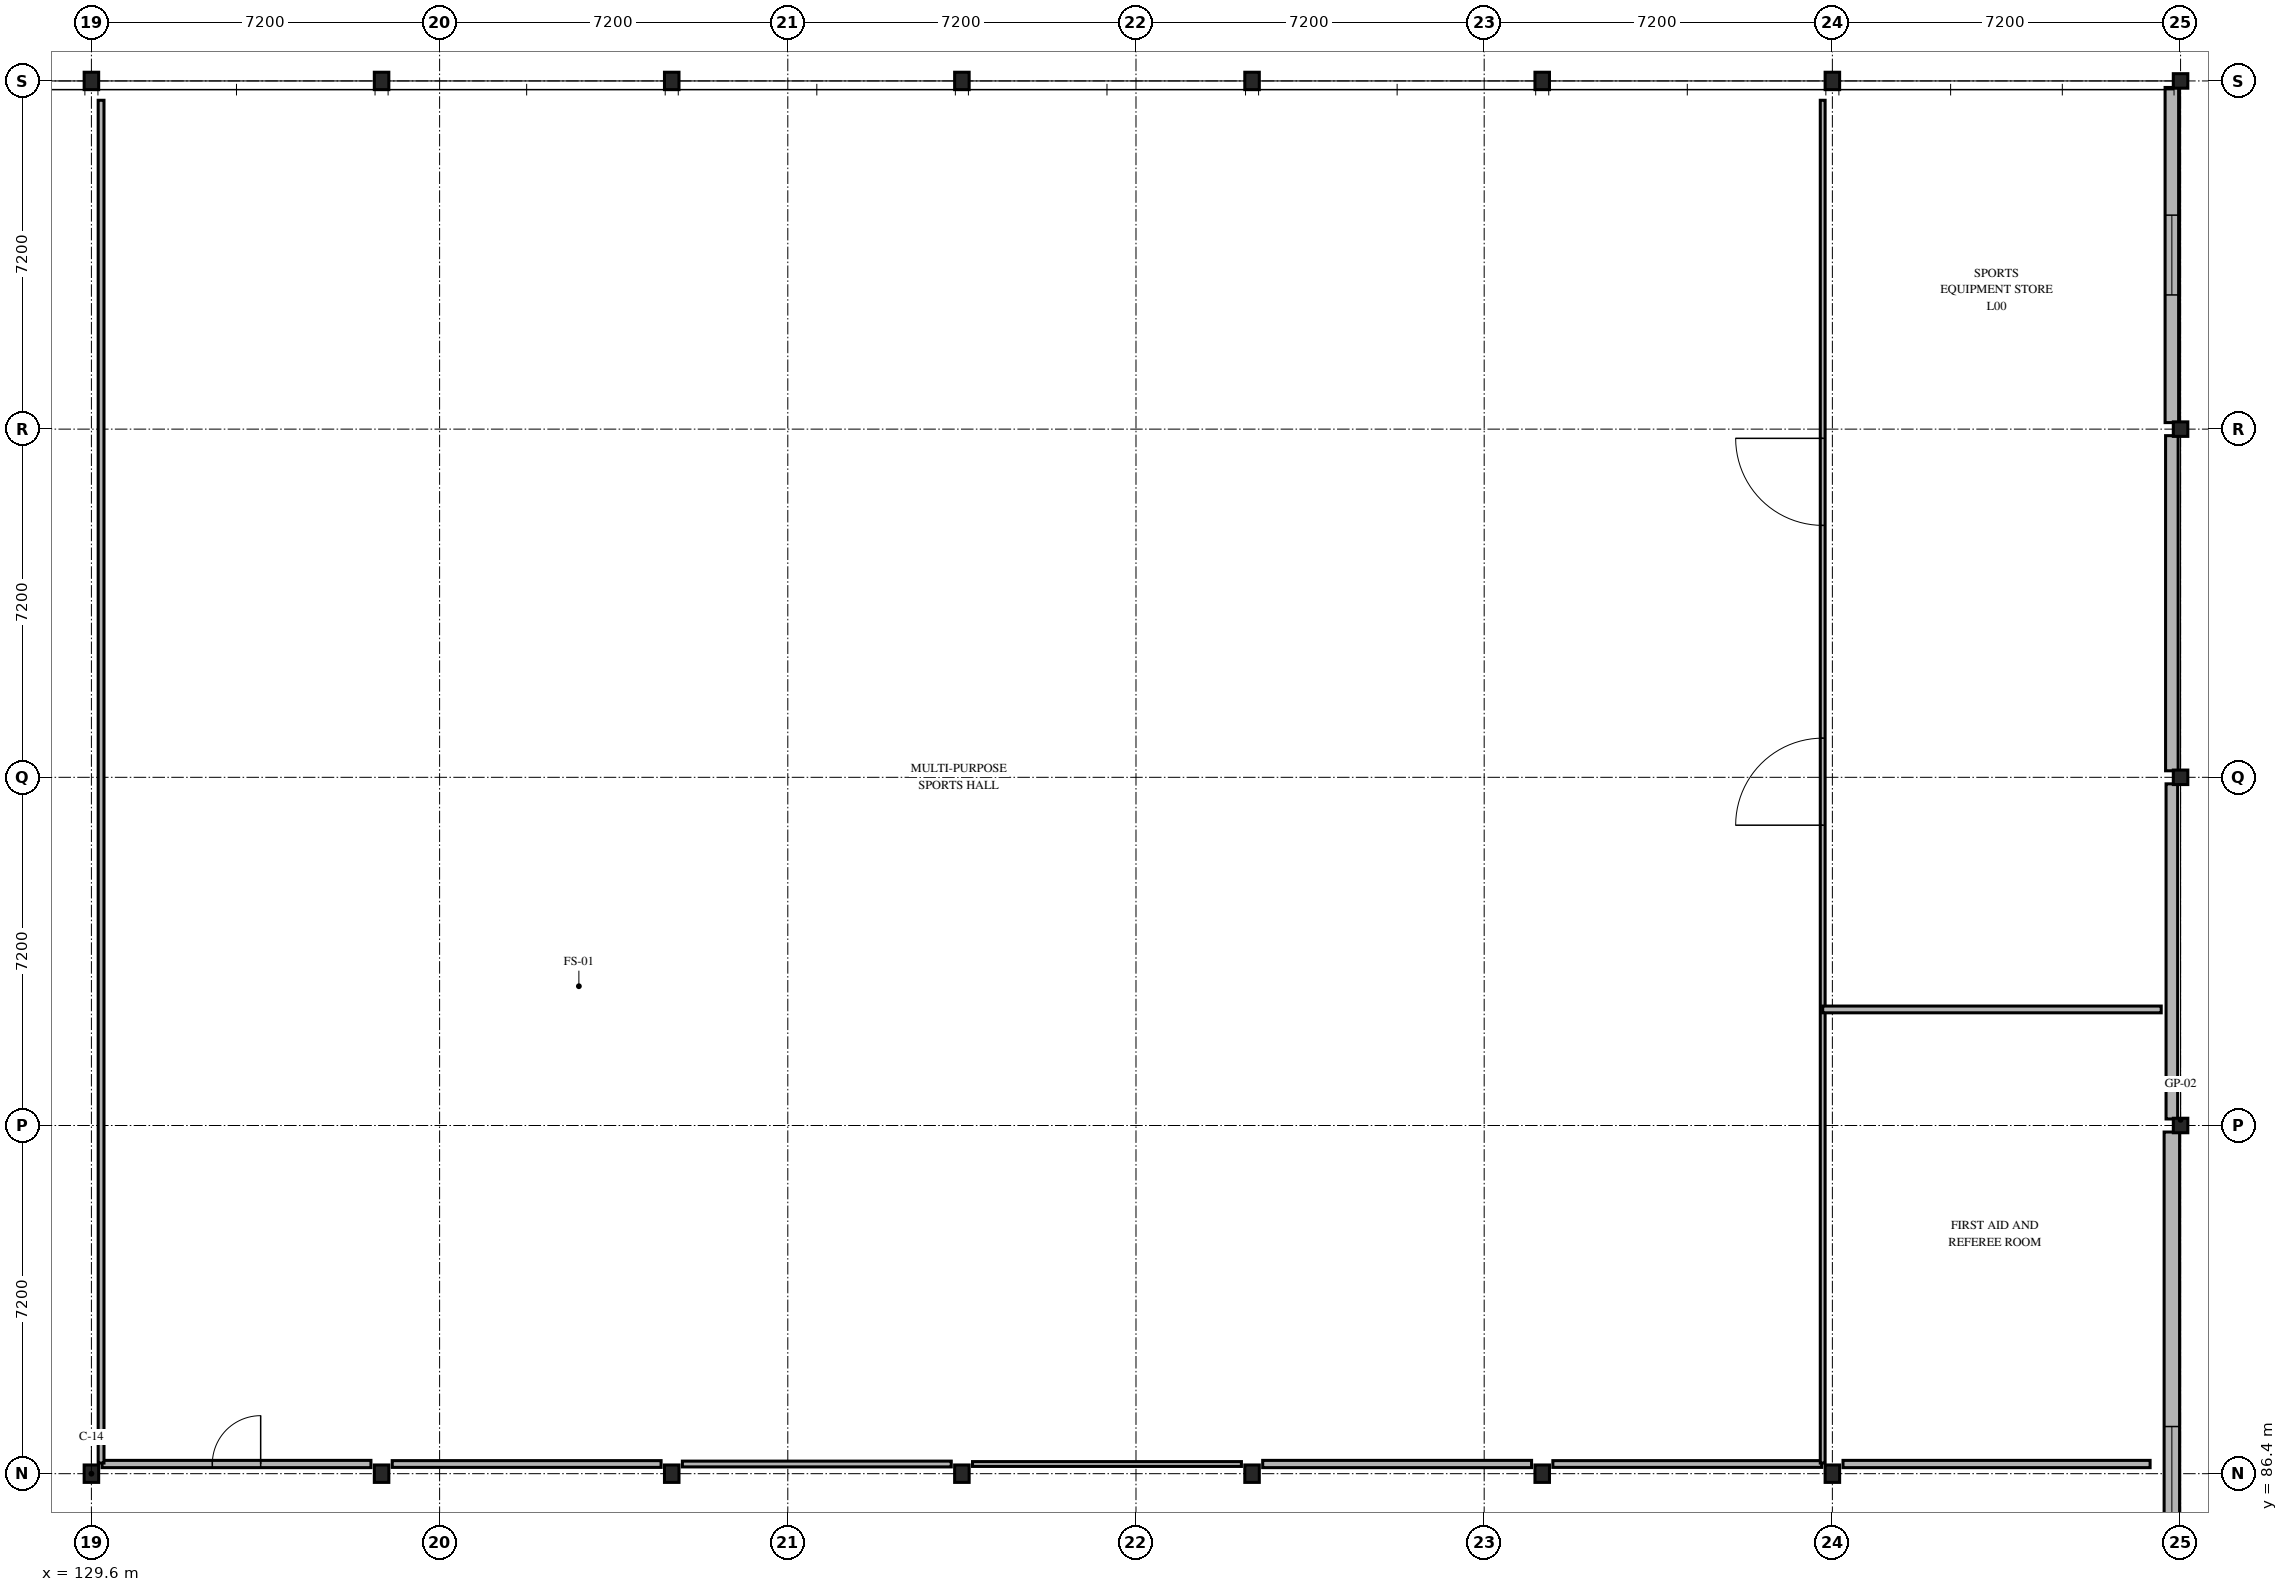
"""IFC4 building model, lengths in metres.
Left out: names, types, materials, properties, quantities, classifications, styles, units other than length and angle.
Written with IfcOpenShell. Run it as: python <this file> out.ifc"""

import sys

from ifc_helpers import new_model, si_unit, direction, frame, frame_2d, origin, origin_2d, place, context, subcontext, project, spatial, rectangle, i_section, extrude, element, fill, save


model = new_model("IFC4")
c1 = context("Model", 3, precision=1e-05, world=origin(), true_north=direction((0.0, 1.0)))
c2 = subcontext(c1, "Body", "Model", "MODEL_VIEW")
j1 = project(units=[si_unit("LENGTHUNIT", "METRE"), si_unit("PLANEANGLEUNIT", "RADIAN")], contexts=[c1])
p1 = place(None, origin())
s1 = spatial("IfcSite", under=j1, at=p1, CompositionType="ELEMENT")
p2 = place(p1, origin())
s2 = spatial("IfcBuilding", under=s1, at=p2, CompositionType="ELEMENT")
p3 = place(p2, origin())
s3 = spatial("IfcBuildingStorey", under=s2, at=p3, CompositionType="ELEMENT", Elevation=0.0)
for number, where, z_axis, x_axis in (
    (1, (129.6, 86.4, 0.0), (0.0, 0.0, 1.0), (1.0, 0.0, 0.0)),
    (2, (129.6, 115.2, 0.0), (0.0, 0.0, 1.0), (1.0, 0.0, 0.0)),
    (3, (135.6, 86.4, 0.0), (0.0, 0.0, 1.0), (1.0, 0.0, 0.0)),
    (4, (135.6, 115.2, 0.0), (0.0, 0.0, 1.0), (1.0, 0.0, 0.0)),
    (5, (141.6, 86.4, 0.0), (0.0, 0.0, 1.0), (1.0, 0.0, 0.0)),
    (6, (141.6, 115.2, 0.0), (0.0, 0.0, 1.0), (1.0, 0.0, 0.0)),
    (7, (147.6, 86.4, 0.0), (0.0, 0.0, 1.0), (1.0, 0.0, 0.0)),
    (8, (147.6, 115.2, 0.0), (0.0, 0.0, 1.0), (1.0, 0.0, 0.0)),
    (9, (153.6, 86.4, 0.0), (0.0, 0.0, 1.0), (1.0, 0.0, 0.0)),
    (10, (153.6, 115.2, 0.0), (0.0, 0.0, 1.0), (1.0, 0.0, 0.0)),
    (11, (159.6, 86.4, 0.0), (0.0, 0.0, 1.0), (1.0, 0.0, 0.0)),
    (12, (159.6, 115.2, 0.0), (0.0, 0.0, 1.0), (1.0, 0.0, 0.0)),
    (13, (165.6, 86.4, 0.0), (0.0, 0.0, 1.0), (1.0, 0.0, 0.0)),
    (14, (165.6, 115.2, 0.0), (0.0, 0.0, 1.0), (1.0, 0.0, 0.0)),
):
    element("IfcColumn", number, at=place(p3, frame(where, z_axis=z_axis, x_axis=x_axis)), inside=s3, PredefinedType="COLUMN", context=c2, shape_type="SweptSolid", body=[
        extrude(i_section(OverallWidth=0.3, OverallDepth=0.36, WebThickness=0.012, FlangeThickness=0.022, FilletRadius=0.027, at=origin_2d()), origin(), (0.0, 0.0, 1.0), 4.5),
    ])
for number, where, z_axis, x_axis in (
    (15, (172.8, 93.6, 0.0), (0.0, 0.0, 1.0), (1.0, 0.0, 0.0)),
    (16, (172.8, 100.8, 0.0), (0.0, 0.0, 1.0), (1.0, 0.0, 0.0)),
    (17, (172.8, 108.0, 0.0), (0.0, 0.0, 1.0), (1.0, 0.0, 0.0)),
    (18, (172.8, 115.2, 0.0), (0.0, 0.0, 1.0), (1.0, 0.0, 0.0)),
):
    element("IfcColumn", number, at=place(p3, frame(where, z_axis=z_axis, x_axis=x_axis)), inside=s3, PredefinedType="COLUMN", context=c2, shape_type="SweptSolid", body=[
        extrude(i_section(OverallWidth=0.3, OverallDepth=0.3, WebThickness=0.011, FlangeThickness=0.019, FilletRadius=0.027, at=origin_2d()), origin(), (0.0, 0.0, 1.0), 4.5),
    ])
p4 = place(p3, frame((172.62, 115.065, 0.0), z_axis=(0.0, 0.0, 1.0), x_axis=(0.0, -1.0, 0.0)))
e19 = element("IfcWall", 19, at=p4, inside=s3, PredefinedType="SOLIDWALL", context=c2, shape_type="SweptSolid", body=[
    extrude(rectangle(XDim=6.93, YDim=0.28, at=frame_2d((3.465, 0.0))), origin(), (0.0, 0.0, 1.0), 4.24),
])
p5 = place(p4, frame((2.64, 0.0, 0.9)))
e20 = element("IfcOpeningElement", 20, at=p5, cuts=e19, PredefinedType="OPENING", context=c2, shape_type="SweptSolid", body=[
    extrude(rectangle(XDim=1.65, YDim=1.2, at=frame_2d((0.825, 0.6))), frame((0.0, 0.15, 0.0), z_axis=(0.0, -1.0, 0.0), x_axis=(1.0, 0.0, 0.0)), (0.0, 0.0, 1.0), 0.3),
])
p6 = place(p3, frame((172.62, 107.865, 0.0), z_axis=(0.0, 0.0, 1.0), x_axis=(0.0, -1.0, 0.0)))
e21 = element("IfcWall", 21, at=p6, inside=s3, PredefinedType="SOLIDWALL", context=c2, shape_type="SweptSolid", body=[
    extrude(rectangle(XDim=6.93, YDim=0.26, at=frame_2d((3.465, 0.0))), origin(), (0.0, 0.0, 1.0), 4.24),
])
p7 = place(p3, frame((172.62, 100.665, 0.0), z_axis=(0.0, 0.0, 1.0), x_axis=(0.0, -1.0, 0.0)))
e22 = element("IfcWall", 22, at=p7, inside=s3, PredefinedType="SOLIDWALL", context=c2, shape_type="SweptSolid", body=[
    extrude(rectangle(XDim=6.93, YDim=0.24, at=frame_2d((3.465, 0.0))), origin(), (0.0, 0.0, 1.0), 4.24),
])
p8 = place(p3, frame((172.62, 93.465, 0.0), z_axis=(0.0, 0.0, 1.0), x_axis=(0.0, -1.0, 0.0)))
e23 = element("IfcWall", 23, at=p8, inside=s3, PredefinedType="SOLIDWALL", context=c2, shape_type="SweptSolid", body=[
    extrude(rectangle(XDim=13.98, YDim=0.32, at=frame_2d((6.99, 0.0))), origin(), (0.0, 0.0, 1.0), 4.24),
])
p9 = place(p8, frame((6.09, 0.0, 0.9)))
e24 = element("IfcOpeningElement", 24, at=p9, cuts=e23, PredefinedType="OPENING", context=c2, shape_type="SweptSolid", body=[
    extrude(rectangle(XDim=1.8, YDim=1.2, at=frame_2d((0.9, 0.6))), frame((0.0, 0.17, 0.0), z_axis=(0.0, -1.0, 0.0), x_axis=(1.0, 0.0, 0.0)), (0.0, 0.0, 1.0), 0.34),
])
p10 = place(p3, frame((129.82, 86.6, 0.0), z_axis=(0.0, 0.0, 1.0), x_axis=(1.0, 0.0, 0.0)))
e25 = element("IfcWall", 25, at=p10, inside=s3, PredefinedType="PARTITIONING", context=c2, shape_type="SweptSolid", body=[
    extrude(rectangle(XDim=5.56, YDim=0.15, at=frame_2d((2.78, 0.0))), origin(), (0.0, 0.0, 1.0), 4.24),
])
p11 = place(p10, frame((2.28, 0.0, 0.0)))
e26 = element("IfcOpeningElement", 26, at=p11, cuts=e25, PredefinedType="OPENING", context=c2, shape_type="SweptSolid", body=[
    extrude(rectangle(XDim=1.0, YDim=2.15, at=frame_2d((0.5, 1.075))), frame((0.0, 0.085, 0.0), z_axis=(0.0, -1.0, 0.0), x_axis=(1.0, 0.0, 0.0)), (0.0, 0.0, 1.0), 0.17),
])
p12 = place(p3, frame((135.82, 86.6, 0.0), z_axis=(0.0, 0.0, 1.0), x_axis=(1.0, 0.0, 0.0)))
e27 = element("IfcWall", 27, at=p12, inside=s3, PredefinedType="PARTITIONING", context=c2, shape_type="SweptSolid", body=[
    extrude(rectangle(XDim=5.56, YDim=0.14, at=frame_2d((2.78, 0.0))), origin(), (0.0, 0.0, 1.0), 4.24),
])
p13 = place(p3, frame((141.82, 86.6, 0.0), z_axis=(0.0, 0.0, 1.0), x_axis=(1.0, 0.0, 0.0)))
e28 = element("IfcWall", 28, at=p13, inside=s3, PredefinedType="PARTITIONING", context=c2, shape_type="SweptSolid", body=[
    extrude(rectangle(XDim=5.56, YDim=0.12, at=frame_2d((2.78, 0.0))), origin(), (0.0, 0.0, 1.0), 4.24),
])
p14 = place(p3, frame((147.82, 86.6, 0.0), z_axis=(0.0, 0.0, 1.0), x_axis=(1.0, 0.0, 0.0)))
e29 = element("IfcWall", 29, at=p14, inside=s3, PredefinedType="PARTITIONING", context=c2, shape_type="SweptSolid", body=[
    extrude(rectangle(XDim=5.56, YDim=0.1, at=frame_2d((2.78, 0.0))), origin(), (0.0, 0.0, 1.0), 4.24),
])
p15 = place(p3, frame((153.82, 86.6, 0.0), z_axis=(0.0, 0.0, 1.0), x_axis=(1.0, 0.0, 0.0)))
e30 = element("IfcWall", 30, at=p15, inside=s3, PredefinedType="PARTITIONING", context=c2, shape_type="SweptSolid", body=[
    extrude(rectangle(XDim=5.56, YDim=0.15, at=frame_2d((2.78, 0.0))), origin(), (0.0, 0.0, 1.0), 4.24),
])
p16 = place(p3, frame((159.82, 86.6, 0.0), z_axis=(0.0, 0.0, 1.0), x_axis=(1.0, 0.0, 0.0)))
e31 = element("IfcWall", 31, at=p16, inside=s3, PredefinedType="PARTITIONING", context=c2, shape_type="SweptSolid", body=[
    extrude(rectangle(XDim=5.56, YDim=0.14, at=frame_2d((2.78, 0.0))), origin(), (0.0, 0.0, 1.0), 4.24),
])
p17 = place(p3, frame((129.8, 114.8, 0.0), z_axis=(0.0, 0.0, 1.0), x_axis=(0.0, -1.0, 0.0)))
e32 = element("IfcWall", 32, at=p17, inside=s3, PredefinedType="PARTITIONING", context=c2, shape_type="SweptSolid", body=[
    extrude(rectangle(XDim=28.18, YDim=0.12, at=frame_2d((14.09, 0.0))), origin(), (0.0, 0.0, 1.0), 4.24),
])
p18 = place(p3, frame((165.4, 86.62, 0.0), z_axis=(0.0, 0.0, 1.0), x_axis=(0.0, 1.0, 0.0)))
e33 = element("IfcWall", 33, at=p18, inside=s3, PredefinedType="PARTITIONING", context=c2, shape_type="SweptSolid", body=[
    extrude(rectangle(XDim=28.18, YDim=0.1, at=frame_2d((14.09, 0.0))), origin(), (0.0, 0.0, 1.0), 4.24),
])
p19 = place(p18, frame((13.19, 0.0, 0.0)))
e34 = element("IfcOpeningElement", 34, at=p19, cuts=e33, PredefinedType="OPENING", context=c2, shape_type="SweptSolid", body=[
    extrude(rectangle(XDim=1.8, YDim=2.3, at=frame_2d((0.9, 1.15))), frame((0.0, 0.06, 0.0), z_axis=(0.0, -1.0, 0.0), x_axis=(1.0, 0.0, 0.0)), (0.0, 0.0, 1.0), 0.12),
])
p20 = place(p18, frame((19.39, 0.0, 0.0)))
e35 = element("IfcOpeningElement", 35, at=p20, cuts=e33, PredefinedType="OPENING", context=c2, shape_type="SweptSolid", body=[
    extrude(rectangle(XDim=1.8, YDim=2.3, at=frame_2d((0.9, 1.15))), frame((0.0, 0.06, 0.0), z_axis=(0.0, -1.0, 0.0), x_axis=(1.0, 0.0, 0.0)), (0.0, 0.0, 1.0), 0.12),
])
p21 = place(p3, frame((165.82, 86.6, 0.0), z_axis=(0.0, 0.0, 1.0), x_axis=(1.0, 0.0, 0.0)))
e36 = element("IfcWall", 36, at=p21, inside=s3, PredefinedType="PARTITIONING", context=c2, shape_type="SweptSolid", body=[
    extrude(rectangle(XDim=6.35, YDim=0.15, at=frame_2d((3.175, 0.0))), origin(), (0.0, 0.0, 1.0), 4.24),
])
p22 = place(p3, frame((172.4, 96.0, 0.0), z_axis=(0.0, 0.0, 1.0), x_axis=(-1.0, 0.0, 0.0)))
e37 = element("IfcWall", 37, at=p22, inside=s3, PredefinedType="PARTITIONING", context=c2, shape_type="SweptSolid", body=[
    extrude(rectangle(XDim=7.0, YDim=0.14, at=frame_2d((3.5, 0.0))), origin(), (0.0, 0.0, 1.0), 4.24),
])
p23 = place(p5, origin())
e38 = element("IfcWindow", 38, at=p23, inside=s3, PartitioningType="SINGLE_PANEL", PredefinedType="WINDOW", context=c2, shape_type="SweptSolid", body=[
    extrude(rectangle(XDim=1.65, YDim=1.2, at=frame_2d((0.825, 0.6))), frame((0.0, 0.03, 0.0), z_axis=(0.0, -1.0, 0.0), x_axis=(1.0, 0.0, 0.0)), (0.0, 0.0, 1.0), 0.06),
])
fill(e20, e38)
p24 = place(p9, origin())
e39 = element("IfcWindow", 39, at=p24, inside=s3, PartitioningType="SINGLE_PANEL", PredefinedType="WINDOW", context=c2, shape_type="SweptSolid", body=[
    extrude(rectangle(XDim=1.8, YDim=1.2, at=frame_2d((0.9, 0.6))), frame((0.0, 0.03, 0.0), z_axis=(0.0, -1.0, 0.0), x_axis=(1.0, 0.0, 0.0)), (0.0, 0.0, 1.0), 0.06),
])
fill(e24, e39)
p25 = place(p11, origin())
e40 = element("IfcDoor", 40, at=p25, inside=s3, OperationType="SINGLE_SWING_RIGHT", PredefinedType="DOOR", context=c2, shape_type="SweptSolid", body=[
    extrude(rectangle(XDim=1.0, YDim=2.15, at=frame_2d((0.5, 1.075))), frame((0.0, 0.025, 0.0), z_axis=(0.0, -1.0, 0.0), x_axis=(1.0, 0.0, 0.0)), (0.0, 0.0, 1.0), 0.05),
])
fill(e26, e40)
p26 = place(p19, origin())
e41 = element("IfcDoor", 41, at=p26, inside=s3, OperationType="SINGLE_SWING_LEFT", PredefinedType="DOOR", context=c2, shape_type="SweptSolid", body=[
    extrude(rectangle(XDim=1.8, YDim=2.3, at=frame_2d((0.9, 1.15))), frame((0.0, 0.025, 0.0), z_axis=(0.0, -1.0, 0.0), x_axis=(1.0, 0.0, 0.0)), (0.0, 0.0, 1.0), 0.05),
])
fill(e34, e41)
p27 = place(p20, origin())
e42 = element("IfcDoor", 42, at=p27, inside=s3, OperationType="SINGLE_SWING_RIGHT", PredefinedType="DOOR", context=c2, shape_type="SweptSolid", body=[
    extrude(rectangle(XDim=1.8, YDim=2.3, at=frame_2d((0.9, 1.15))), frame((0.0, 0.025, 0.0), z_axis=(0.0, -1.0, 0.0), x_axis=(1.0, 0.0, 0.0)), (0.0, 0.0, 1.0), 0.05),
])
fill(e35, e42)
save(model, sys.argv[1])
